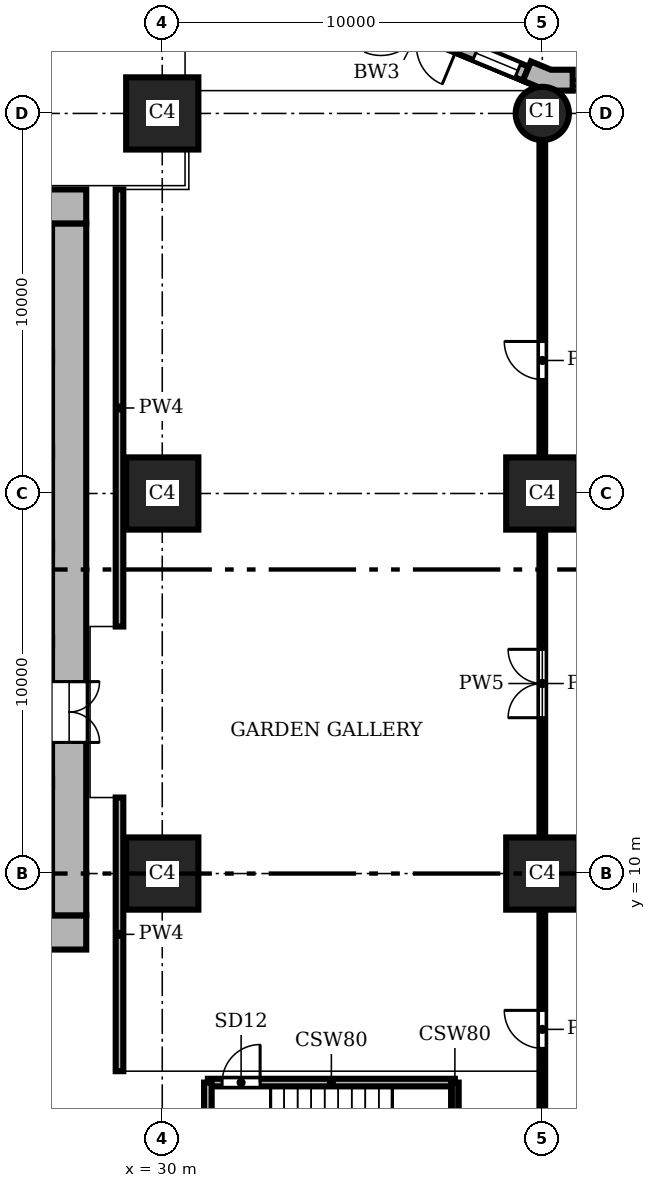
"""IFC4 building model, lengths in metres.
Left out: names, types, materials, properties, quantities, classifications, styles, units other than length and angle.
Written with IfcOpenShell. Run it as: python <this file> out.ifc"""

import sys

from ifc_helpers import new_model, si_unit, direction, frame, frame_2d, origin, origin_2d, place, context, subcontext, project, spatial, polyline, rectangle, circle, outline, extrude, element, fill, save


model = new_model("IFC4")
c1 = context("Model", 3, precision=1e-05, world=origin(), true_north=direction((0.0, 1.0)))
c2 = subcontext(c1, "Body", "Model", "MODEL_VIEW")
j1 = project(units=[si_unit("LENGTHUNIT", "METRE"), si_unit("PLANEANGLEUNIT", "RADIAN")], contexts=[c1])
p1 = place(None, origin())
s1 = spatial("IfcSite", under=j1, at=p1, CompositionType="ELEMENT")
p2 = place(p1, origin())
s2 = spatial("IfcBuilding", under=s1, at=p2, CompositionType="ELEMENT")
p3 = place(p2, frame((0.0, 0.0, 6.0)))
s3 = spatial("IfcBuildingStorey", under=s2, at=p3, CompositionType="ELEMENT", Elevation=6.0)
p4 = place(p3, frame((40.0, 30.0, 0.0), z_axis=(0.0, 0.0, 1.0), x_axis=(1.0, 0.0, 0.0)))
e1 = element("IfcColumn", 1, at=p4, inside=s3, PredefinedType="COLUMN", context=c2, shape_type="SweptSolid", body=[
    extrude(circle(Radius=0.7, at=origin_2d()), origin(), (0.0, 0.0, 1.0), 6.0),
])
for number, where, z_axis, x_axis in (
    (2, (30.0, 10.0, 0.0), (0.0, 0.0, 1.0), (1.0, 0.0, 0.0)),
    (3, (30.0, 20.0, 0.0), (0.0, 0.0, 1.0), (1.0, 0.0, 0.0)),
    (4, (30.0, 30.0, 0.0), (0.0, 0.0, 1.0), (1.0, 0.0, 0.0)),
    (5, (40.0, 10.0, 0.0), (0.0, 0.0, 1.0), (1.0, 0.0, 0.0)),
    (6, (40.0, 20.0, 0.0), (0.0, 0.0, 1.0), (1.0, 0.0, 0.0)),
):
    element("IfcColumn", number, at=place(p3, frame(where, z_axis=z_axis, x_axis=x_axis)), inside=s3, PredefinedType="COLUMN", context=c2, shape_type="SweptSolid", body=[
        extrude(rectangle(XDim=1.9, YDim=1.9, at=origin_2d()), origin(), (0.0, 0.0, 1.0), 6.0),
    ])
p5 = place(p3, frame((8.0, 8.45, 0.0), z_axis=(0.0, 0.0, 1.0), x_axis=(1.0, 0.0, 0.0)))
e7 = element("IfcWall", 7, at=p5, inside=s3, PredefinedType="SHEAR", context=c2, shape_type="SweptSolid", body=[
    extrude(rectangle(XDim=20.0, YDim=0.9, at=frame_2d((10.0, 0.0))), origin(), (0.0, 0.0, 1.0), 6.0),
])
p6 = place(p3, frame((27.55, 8.9, 0.0), z_axis=(0.0, 0.0, 1.0), x_axis=(0.0, 1.0, 0.0)))
e8 = element("IfcWall", 8, at=p6, inside=s3, PredefinedType="SHEAR", context=c2, shape_type="SweptSolid", body=[
    extrude(rectangle(XDim=18.2, YDim=0.9, at=frame_2d((9.1, 0.0))), origin(), (0.0, 0.0, 1.0), 6.0),
])
p7 = place(p6, frame((4.55, 0.0, 0.0)))
e9 = element("IfcOpeningElement", 9, at=p7, cuts=e8, PredefinedType="OPENING", context=c2, shape_type="SweptSolid", body=[
    extrude(rectangle(XDim=1.6, YDim=2.1, at=frame_2d((0.8, 1.05))), frame((0.0, 0.46, 0.0), z_axis=(0.0, -1.0, 0.0), x_axis=(1.0, 0.0, 0.0)), (0.0, 0.0, 1.0), 0.92),
])
p8 = place(p3, frame((28.0, 27.55, 0.0), z_axis=(0.0, 0.0, 1.0), x_axis=(-1.0, 0.0, 0.0)))
e10 = element("IfcWall", 10, at=p8, inside=s3, PredefinedType="SHEAR", context=c2, shape_type="SweptSolid", body=[
    extrude(rectangle(XDim=20.0, YDim=0.9, at=frame_2d((10.0, 0.0))), origin(), (0.0, 0.0, 1.0), 6.0),
])
p9 = place(p3, origin())
e11 = element("IfcWall", 11, at=p9, inside=s3, PredefinedType="SOLIDWALL", context=c2, shape_type="SweptSolid", body=[
    extrude(outline(polyline([(40.8, 31.0), (40.8, 31.15), (40.229, 31.15), (39.701, 31.369), (39.644, 31.23), (39.49, 30.861), (40.119, 30.6), (40.8, 30.6), (40.8, 31.0)])), origin(), (0.0, 0.0, 1.0), 6.0),
])
p10 = place(p3, frame((39.567, 31.045, 0.0), z_axis=(0.0, 0.0, 1.0), x_axis=(-0.923891000409, 0.382655745237, 0.0)))
e12 = element("IfcWall", 12, at=p10, inside=s3, PredefinedType="SOLIDWALL", context=c2, shape_type="SweptSolid", body=[
    extrude(rectangle(XDim=6.053, YDim=0.4, at=frame_2d((3.027, 0.0))), origin(), (0.0, 0.0, 1.0), 6.0),
])
p11 = place(p10, frame((0.227, 0.0, 0.9)))
e13 = element("IfcOpeningElement", 13, at=p11, cuts=e12, PredefinedType="OPENING", context=c2, shape_type="SweptSolid", body=[
    extrude(rectangle(XDim=1.2, YDim=4.4, at=frame_2d((0.6, 2.2))), frame((0.0, 0.21, 0.0), z_axis=(0.0, -1.0, 0.0), x_axis=(1.0, 0.0, 0.0)), (0.0, 0.0, 1.0), 0.42),
])
p12 = place(p10, frame((1.927, 0.0, 0.0)))
e14 = element("IfcOpeningElement", 14, at=p12, cuts=e12, PredefinedType="OPENING", context=c2, shape_type="SweptSolid", body=[
    extrude(rectangle(XDim=2.2, YDim=2.4, at=frame_2d((1.1, 1.2))), frame((0.0, 0.21, 0.0), z_axis=(0.0, -1.0, 0.0), x_axis=(1.0, 0.0, 0.0)), (0.0, 0.0, 1.0), 0.42),
])
p13 = place(p10, frame((4.627, 0.0, 0.9)))
e15 = element("IfcOpeningElement", 15, at=p13, cuts=e12, PredefinedType="OPENING", context=c2, shape_type="SweptSolid", body=[
    extrude(rectangle(XDim=1.2, YDim=4.4, at=frame_2d((0.6, 2.2))), frame((0.0, 0.21, 0.0), z_axis=(0.0, -1.0, 0.0), x_axis=(1.0, 0.0, 0.0)), (0.0, 0.0, 1.0), 0.42),
])
p14 = place(p3, frame((31.2, 4.5, 0.0), z_axis=(0.0, 0.0, 1.0), x_axis=(1.0, 0.0, 0.0)))
e16 = element("IfcWall", 16, at=p14, inside=s3, PredefinedType="SHEAR", context=c2, shape_type="SweptSolid", body=[
    extrude(rectangle(XDim=6.5, YDim=0.2, at=frame_2d((3.25, 0.0))), origin(), (0.0, 0.0, 1.0), 5.68),
])
p15 = place(p14, frame((0.375, 0.0, 0.0)))
e17 = element("IfcOpeningElement", 17, at=p15, cuts=e16, PredefinedType="OPENING", context=c2, shape_type="SweptSolid", body=[
    extrude(rectangle(XDim=1.0, YDim=2.1, at=frame_2d((0.5, 1.05))), frame((0.0, 0.11, 0.0), z_axis=(0.0, -1.0, 0.0), x_axis=(1.0, 0.0, 0.0)), (0.0, 0.0, 1.0), 0.22),
])
for number, where, z_axis, x_axis in (
    (18, (31.2, 1.2, 0.0), (0.0, 0.0, 1.0), (0.0, 1.0, 0.0)),
    (19, (37.7, 1.2, 0.0), (0.0, 0.0, 1.0), (0.0, 1.0, 0.0)),
):
    element("IfcWall", number, at=place(p3, frame(where, z_axis=z_axis, x_axis=x_axis)), inside=s3, PredefinedType="SHEAR", context=c2, shape_type="SweptSolid", body=[
        extrude(rectangle(XDim=3.3, YDim=0.2, at=frame_2d((1.65, 0.0))), origin(), (0.0, 0.0, 1.0), 5.68),
    ])
p16 = place(p3, frame((40.0, -0.6, 0.0), z_axis=(0.0, 0.0, 1.0), x_axis=(0.0, 1.0, 0.0)))
e20 = element("IfcWall", 20, at=p16, inside=s3, PredefinedType="PARTITIONING", context=c2, shape_type="SweptSolid", body=[
    extrude(rectangle(XDim=31.2, YDim=0.15, at=frame_2d((15.6, 0.0))), origin(), (0.0, 0.0, 1.0), 5.68),
])
p17 = place(p16, frame((14.7, 0.0, 0.0)))
e21 = element("IfcOpeningElement", 21, at=p17, cuts=e20, PredefinedType="OPENING", context=c2, shape_type="SweptSolid", body=[
    extrude(rectangle(XDim=1.8, YDim=2.1, at=frame_2d((0.9, 1.05))), frame((0.0, 0.085, 0.0), z_axis=(0.0, -1.0, 0.0), x_axis=(1.0, 0.0, 0.0)), (0.0, 0.0, 1.0), 0.17),
])
p18 = place(p16, frame((6.0, 0.0, 0.0)))
e22 = element("IfcOpeningElement", 22, at=p18, cuts=e20, PredefinedType="OPENING", context=c2, shape_type="SweptSolid", body=[
    extrude(rectangle(XDim=1.0, YDim=2.1, at=frame_2d((0.5, 1.05))), frame((0.0, 0.085, 0.0), z_axis=(0.0, -1.0, 0.0), x_axis=(1.0, 0.0, 0.0)), (0.0, 0.0, 1.0), 0.17),
])
p19 = place(p16, frame((23.6, 0.0, 0.0)))
e23 = element("IfcOpeningElement", 23, at=p19, cuts=e20, PredefinedType="OPENING", context=c2, shape_type="SweptSolid", body=[
    extrude(rectangle(XDim=1.0, YDim=2.1, at=frame_2d((0.5, 1.05))), frame((0.0, 0.085, 0.0), z_axis=(0.0, -1.0, 0.0), x_axis=(1.0, 0.0, 0.0)), (0.0, 0.0, 1.0), 0.17),
])
p20 = place(p3, frame((28.875, 4.8, 0.0), z_axis=(0.0, 0.0, 1.0), x_axis=(0.0, 1.0, 0.0)))
e24 = element("IfcWall", 24, at=p20, inside=s3, PredefinedType="PARTITIONING", context=c2, shape_type="SweptSolid", body=[
    extrude(rectangle(XDim=7.2, YDim=0.2, at=frame_2d((3.6, 0.0))), origin(), (0.0, 0.0, 1.0), 5.68),
])
p21 = place(p3, frame((28.875, 16.5, 0.0), z_axis=(0.0, 0.0, 1.0), x_axis=(0.0, 1.0, 0.0)))
e25 = element("IfcWall", 25, at=p21, inside=s3, PredefinedType="PARTITIONING", context=c2, shape_type="SweptSolid", body=[
    extrude(rectangle(XDim=11.5, YDim=0.2, at=frame_2d((5.75, 0.0))), origin(), (0.0, 0.0, 1.0), 5.68),
])
p22 = place(p11, origin())
e26 = element("IfcWindow", 26, at=p22, inside=s3, PartitioningType="SINGLE_PANEL", PredefinedType="WINDOW", context=c2, shape_type="SweptSolid", body=[
    extrude(rectangle(XDim=1.2, YDim=4.4, at=frame_2d((0.6, 2.2))), frame((0.0, 0.16, 0.0), z_axis=(0.0, -1.0, 0.0), x_axis=(1.0, 0.0, 0.0)), (0.0, 0.0, 1.0), 0.06),
])
fill(e13, e26)
p23 = place(p15, origin())
e27 = element("IfcDoor", 27, at=p23, inside=s3, OperationType="SINGLE_SWING_RIGHT", PredefinedType="DOOR", context=c2, shape_type="SweptSolid", body=[
    extrude(rectangle(XDim=1.0, YDim=2.1, at=frame_2d((0.5, 1.05))), frame((0.0, 0.025, 0.0), z_axis=(0.0, -1.0, 0.0), x_axis=(1.0, 0.0, 0.0)), (0.0, 0.0, 1.0), 0.05),
])
fill(e17, e27)
p24 = place(p7, frame((1.6, 0.0, 0.0), z_axis=(0.0, 0.0, 1.0), x_axis=(-1.0, 0.0, 0.0)))
e28 = element("IfcDoor", 28, at=p24, inside=s3, OperationType="DOUBLE_DOOR_SINGLE_SWING", PredefinedType="DOOR", context=c2, shape_type="SweptSolid", body=[
    extrude(rectangle(XDim=1.6, YDim=2.1, at=frame_2d((0.8, 1.05))), frame((0.0, 0.025, 0.0), z_axis=(0.0, -1.0, 0.0), x_axis=(1.0, 0.0, 0.0)), (0.0, 0.0, 1.0), 0.05),
])
fill(e9, e28)
p25 = place(p17, origin())
e29 = element("IfcDoor", 29, at=p25, inside=s3, OperationType="DOUBLE_DOOR_SINGLE_SWING", PredefinedType="DOOR", context=c2, shape_type="SweptSolid", body=[
    extrude(rectangle(XDim=1.8, YDim=2.1, at=frame_2d((0.9, 1.05))), frame((0.0, 0.025, 0.0), z_axis=(0.0, -1.0, 0.0), x_axis=(1.0, 0.0, 0.0)), (0.0, 0.0, 1.0), 0.05),
])
fill(e21, e29)
p26 = place(p18, origin())
e30 = element("IfcDoor", 30, at=p26, inside=s3, OperationType="SINGLE_SWING_RIGHT", PredefinedType="DOOR", context=c2, shape_type="SweptSolid", body=[
    extrude(rectangle(XDim=1.0, YDim=2.1, at=frame_2d((0.5, 1.05))), frame((0.0, 0.025, 0.0), z_axis=(0.0, -1.0, 0.0), x_axis=(1.0, 0.0, 0.0)), (0.0, 0.0, 1.0), 0.05),
])
fill(e22, e30)
p27 = place(p19, origin())
e31 = element("IfcDoor", 31, at=p27, inside=s3, OperationType="SINGLE_SWING_RIGHT", PredefinedType="DOOR", context=c2, shape_type="SweptSolid", body=[
    extrude(rectangle(XDim=1.0, YDim=2.1, at=frame_2d((0.5, 1.05))), frame((0.0, 0.025, 0.0), z_axis=(0.0, -1.0, 0.0), x_axis=(1.0, 0.0, 0.0)), (0.0, 0.0, 1.0), 0.05),
])
fill(e23, e31)
save(model, sys.argv[1])
